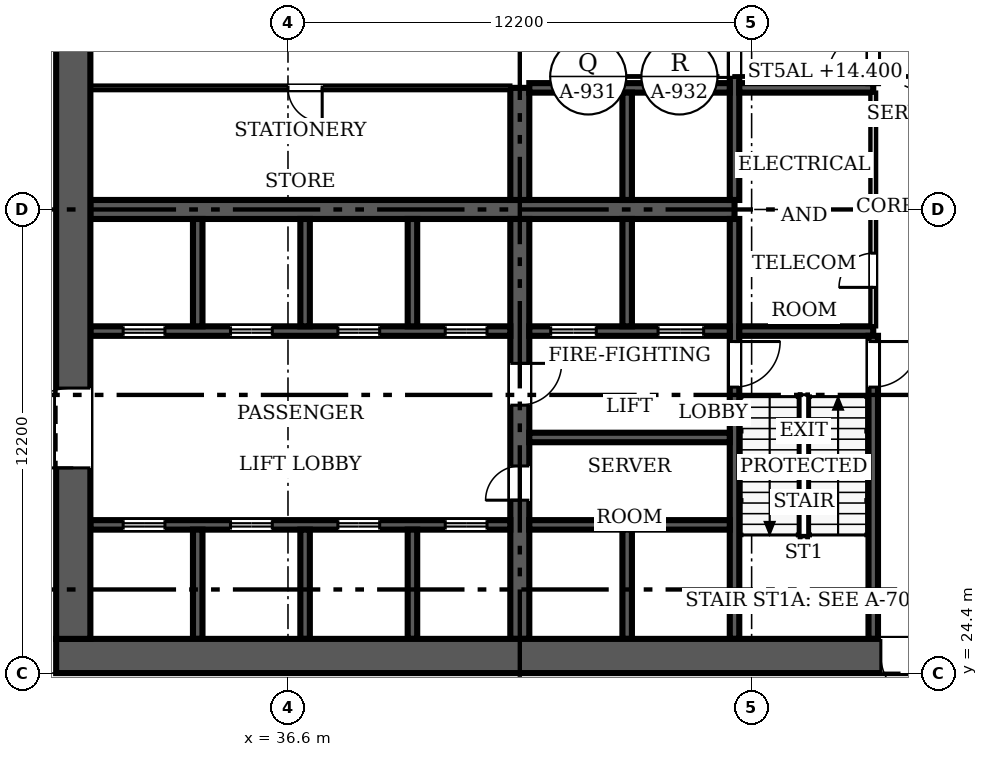
"""IFC4 building model, lengths in metres.
Left out: names, types, materials, properties, quantities, classifications, styles, units other than length and angle.
Written with IfcOpenShell. Run it as: python <this file> out.ifc"""

import sys

from ifc_helpers import new_model, si_unit, direction, frame, frame_2d, origin, place, context, subcontext, project, spatial, rectangle, extrude, source, transform, mapped, element, fill, save


model = new_model("IFC4")
c1 = context("Model", 3, precision=1e-05, world=origin(), true_north=direction((0.0, 1.0)))
c2 = subcontext(c1, "Body", "Model", "MODEL_VIEW")
j1 = project(units=[si_unit("LENGTHUNIT", "METRE"), si_unit("PLANEANGLEUNIT", "RADIAN")], contexts=[c1])
p1 = place(None, origin())
s1 = spatial("IfcSite", under=j1, at=p1, CompositionType="ELEMENT")
p2 = place(p1, origin())
s2 = spatial("IfcBuilding", under=s1, at=p2, CompositionType="ELEMENT")
p3 = place(p2, frame((0.0, 0.0, 12.0)))
s3 = spatial("IfcBuildingStorey", under=s2, at=p3, CompositionType="ELEMENT", Elevation=12.0)
p4 = place(p3, frame((54.9, 24.85, 0.0), z_axis=(0.0, 0.0, 1.0), x_axis=(-1.0, 0.0, 0.0)))
e1 = element("IfcWall", 1, at=p4, inside=s3, PredefinedType="SHEAR", context=c2, shape_type="SweptSolid", body=[
    extrude(rectangle(XDim=24.4, YDim=0.9, at=frame_2d((12.2, 0.0))), origin(), (0.0, 0.0, 1.0), 4.8),
])
m1 = source(origin(), c2, "Body", "SweptSolid", [
    extrude(rectangle(XDim=1.2, YDim=2.1, at=frame_2d((0.6, 1.05))), frame((0.0, 0.46, 0.0), z_axis=(0.0, -1.0, 0.0), x_axis=(1.0, 0.0, 0.0)), (0.0, 0.0, 1.0), 0.92),
])
p5 = place(p4, frame((1.5, 0.0, 0.0)))
e2 = element("IfcOpeningElement", 2, at=p5, cuts=e1, PredefinedType="OPENING", context=c2, shape_type="MappedRepresentation", body=[
    mapped(m1, transform((0.0, 0.0, 0.0), scale=1.0)),
])
p6 = place(p3, frame((30.95, 25.3, 0.0), z_axis=(0.0, 0.0, 1.0), x_axis=(0.0, 1.0, 0.0)))
e3 = element("IfcWall", 3, at=p6, inside=s3, PredefinedType="SHEAR", context=c2, shape_type="SweptSolid", body=[
    extrude(rectangle(XDim=22.6, YDim=0.9, at=frame_2d((11.3, 0.0))), origin(), (0.0, 0.0, 1.0), 4.8),
])
m2 = source(origin(), c2, "Body", "SweptSolid", [
    extrude(rectangle(XDim=2.1, YDim=2.4, at=frame_2d((1.05, 1.2))), frame((0.0, 0.46, 0.0), z_axis=(0.0, -1.0, 0.0), x_axis=(1.0, 0.0, 0.0)), (0.0, 0.0, 1.0), 0.92),
])
p7 = place(p6, frame((4.5, 0.0, 0.0)))
e4 = element("IfcOpeningElement", 4, at=p7, cuts=e3, PredefinedType="OPENING", context=c2, shape_type="MappedRepresentation", body=[
    mapped(m2, transform((0.0, 0.0, 0.0), scale=1.0)),
])
p8 = place(p6, frame((16.0, 0.0, 0.0)))
e5 = element("IfcOpeningElement", 5, at=p8, cuts=e3, PredefinedType="OPENING", context=c2, shape_type="MappedRepresentation", body=[
    mapped(m2, transform((0.0, 0.0, 0.0), scale=1.0)),
])
p9 = place(p3, frame((31.4, 36.6, 0.0), z_axis=(0.0, 0.0, 1.0), x_axis=(1.0, 0.0, 0.0)))
e6 = element("IfcWall", 6, at=p9, inside=s3, PredefinedType="SHEAR", context=c2, shape_type="SweptSolid", body=[
    extrude(rectangle(XDim=16.95, YDim=0.5, at=frame_2d((8.475, 0.0))), origin(), (0.0, 0.0, 1.0), 4.8),
])
p10 = place(p3, frame((42.7, 36.35, 0.0), z_axis=(0.0, 0.0, 1.0), x_axis=(0.0, -1.0, 0.0)))
e7 = element("IfcWall", 7, at=p10, inside=s3, PredefinedType="SHEAR", context=c2, shape_type="SweptSolid", body=[
    extrude(rectangle(XDim=11.05, YDim=0.5, at=frame_2d((5.525, 0.0))), origin(), (0.0, 0.0, 1.0), 4.8),
])
m3 = source(origin(), c2, "Body", "SweptSolid", [
    extrude(rectangle(XDim=0.9, YDim=2.1, at=frame_2d((0.45, 1.05))), frame((0.0, 0.26, 0.0), z_axis=(0.0, -1.0, 0.0), x_axis=(1.0, 0.0, 0.0)), (0.0, 0.0, 1.0), 0.52),
])
p11 = place(p10, frame((6.5, 0.0, 0.0)))
e8 = element("IfcOpeningElement", 8, at=p11, cuts=e7, PredefinedType="OPENING", context=c2, shape_type="MappedRepresentation", body=[
    mapped(m3, transform((0.0, 0.0, 0.0), scale=1.0)),
])
m4 = source(origin(), c2, "Body", "SweptSolid", [
    extrude(rectangle(XDim=1.1, YDim=2.1, at=frame_2d((0.55, 1.05))), frame((0.0, 0.26, 0.0), z_axis=(0.0, -1.0, 0.0), x_axis=(1.0, 0.0, 0.0)), (0.0, 0.0, 1.0), 0.52),
])
p12 = place(p10, frame((3.8, 0.0, 0.0)))
e9 = element("IfcOpeningElement", 9, at=p12, cuts=e7, PredefinedType="OPENING", context=c2, shape_type="MappedRepresentation", body=[
    mapped(m4, transform((0.0, 0.0, 0.0), scale=1.0)),
])
p13 = place(p3, frame((42.7, 36.85, 0.0), z_axis=(0.0, 0.0, 1.0), x_axis=(0.0, 1.0, 0.0)))
e10 = element("IfcWall", 10, at=p13, inside=s3, PredefinedType="SHEAR", context=c2, shape_type="SweptSolid", body=[
    extrude(rectangle(XDim=2.95, YDim=0.5, at=frame_2d((1.475, 0.0))), origin(), (0.0, 0.0, 1.0), 4.8),
])
p14 = place(p3, frame((48.35, 36.35, 0.0), z_axis=(0.0, 0.0, 1.0), x_axis=(0.0, -1.0, 0.0)))
e11 = element("IfcWall", 11, at=p14, inside=s3, PredefinedType="SOLIDWALL", context=c2, shape_type="SweptSolid", body=[
    extrude(rectangle(XDim=11.05, YDim=0.25, at=frame_2d((5.525, 0.0))), origin(), (0.0, 0.0, 1.0), 4.8),
])
m5 = source(origin(), c2, "Body", "SweptSolid", [
    extrude(rectangle(XDim=1.2, YDim=2.1, at=frame_2d((0.6, 1.05))), frame((0.0, 0.135, 0.0), z_axis=(0.0, -1.0, 0.0), x_axis=(1.0, 0.0, 0.0)), (0.0, 0.0, 1.0), 0.27),
])
p15 = place(p14, frame((3.225, 0.0, 0.0)))
e12 = element("IfcOpeningElement", 12, at=p15, cuts=e11, PredefinedType="OPENING", context=c2, shape_type="MappedRepresentation", body=[
    mapped(m5, transform((0.0, 0.0, 0.0), scale=1.0)),
])
p16 = place(p3, frame((48.35, 47.9, 0.0), z_axis=(0.0, 0.0, 1.0), x_axis=(0.0, -1.0, 0.0)))
e13 = element("IfcWall", 13, at=p16, inside=s3, PredefinedType="SOLIDWALL", context=c2, shape_type="SweptSolid", body=[
    extrude(rectangle(XDim=11.05, YDim=0.25, at=frame_2d((5.525, 0.0))), origin(), (0.0, 0.0, 1.0), 4.8),
])
p17 = place(p16, frame((6.625, 0.0, 0.0)))
e14 = element("IfcOpeningElement", 14, at=p17, cuts=e13, PredefinedType="OPENING", context=c2, shape_type="MappedRepresentation", body=[
    mapped(m5, transform((0.0, 0.0, 0.0), scale=1.0)),
])
p18 = place(p3, frame((42.45, 33.4, 0.0), z_axis=(0.0, 0.0, 1.0), x_axis=(-1.0, 0.0, 0.0)))
e15 = element("IfcWall", 15, at=p18, inside=s3, PredefinedType="SOLIDWALL", context=c2, shape_type="SweptSolid", body=[
    extrude(rectangle(XDim=11.05, YDim=0.25, at=frame_2d((5.525, 0.0))), origin(), (0.0, 0.0, 1.0), 4.8),
])
m6 = source(origin(), c2, "Body", "SweptSolid", [
    extrude(rectangle(XDim=1.1, YDim=2.1, at=frame_2d((0.55, 1.05))), frame((0.0, 0.135, 0.0), z_axis=(0.0, -1.0, 0.0), x_axis=(1.0, 0.0, 0.0)), (0.0, 0.0, 1.0), 0.27),
])
p19 = place(p18, frame((9.087, 0.0, 0.0)))
e16 = element("IfcOpeningElement", 16, at=p19, cuts=e15, PredefinedType="OPENING", context=c2, shape_type="MappedRepresentation", body=[
    mapped(m6, transform((0.0, 0.0, 0.0), scale=1.0)),
])
p20 = place(p18, frame((6.262, 0.0, 0.0)))
e17 = element("IfcOpeningElement", 17, at=p20, cuts=e15, PredefinedType="OPENING", context=c2, shape_type="MappedRepresentation", body=[
    mapped(m6, transform((0.0, 0.0, 0.0), scale=1.0)),
])
p21 = place(p18, frame((3.438, 0.0, 0.0)))
e18 = element("IfcOpeningElement", 18, at=p21, cuts=e15, PredefinedType="OPENING", context=c2, shape_type="MappedRepresentation", body=[
    mapped(m6, transform((0.0, 0.0, 0.0), scale=1.0)),
])
p22 = place(p18, frame((0.613, 0.0, 0.0)))
e19 = element("IfcOpeningElement", 19, at=p22, cuts=e15, PredefinedType="OPENING", context=c2, shape_type="MappedRepresentation", body=[
    mapped(m6, transform((0.0, 0.0, 0.0), scale=1.0)),
])
p23 = place(p3, frame((48.225, 33.4, 0.0), z_axis=(0.0, 0.0, 1.0), x_axis=(-1.0, 0.0, 0.0)))
e20 = element("IfcWall", 20, at=p23, inside=s3, PredefinedType="SOLIDWALL", context=c2, shape_type="SweptSolid", body=[
    extrude(rectangle(XDim=5.275, YDim=0.25, at=frame_2d((2.638, 0.0))), origin(), (0.0, 0.0, 1.0), 4.8),
])
p24 = place(p23, frame((3.512, 0.0, 0.0)))
e21 = element("IfcOpeningElement", 21, at=p24, cuts=e20, PredefinedType="OPENING", context=c2, shape_type="MappedRepresentation", body=[
    mapped(m5, transform((0.0, 0.0, 0.0), scale=1.0)),
])
p25 = place(p23, frame((0.688, 0.0, 0.0)))
e22 = element("IfcOpeningElement", 22, at=p25, cuts=e20, PredefinedType="OPENING", context=c2, shape_type="MappedRepresentation", body=[
    mapped(m5, transform((0.0, 0.0, 0.0), scale=1.0)),
])
p26 = place(p3, frame((48.475, 33.4, 0.0), z_axis=(0.0, 0.0, 1.0), x_axis=(1.0, 0.0, 0.0)))
e23 = element("IfcWall", 23, at=p26, inside=s3, PredefinedType="SOLIDWALL", context=c2, shape_type="SweptSolid", body=[
    extrude(rectangle(XDim=3.525, YDim=0.25, at=frame_2d((1.762, 0.0))), origin(), (0.0, 0.0, 1.0), 4.8),
])
p27 = place(p3, frame((31.4, 28.3, 0.0), z_axis=(0.0, 0.0, 1.0), x_axis=(1.0, 0.0, 0.0)))
e24 = element("IfcWall", 24, at=p27, inside=s3, PredefinedType="SOLIDWALL", context=c2, shape_type="SweptSolid", body=[
    extrude(rectangle(XDim=11.05, YDim=0.25, at=frame_2d((5.525, 0.0))), origin(), (0.0, 0.0, 1.0), 4.8),
])
p28 = place(p27, frame((0.863, 0.0, 0.0)))
e25 = element("IfcOpeningElement", 25, at=p28, cuts=e24, PredefinedType="OPENING", context=c2, shape_type="MappedRepresentation", body=[
    mapped(m6, transform((0.0, 0.0, 0.0), scale=1.0)),
])
p29 = place(p27, frame((3.688, 0.0, 0.0)))
e26 = element("IfcOpeningElement", 26, at=p29, cuts=e24, PredefinedType="OPENING", context=c2, shape_type="MappedRepresentation", body=[
    mapped(m6, transform((0.0, 0.0, 0.0), scale=1.0)),
])
p30 = place(p27, frame((6.512, 0.0, 0.0)))
e27 = element("IfcOpeningElement", 27, at=p30, cuts=e24, PredefinedType="OPENING", context=c2, shape_type="MappedRepresentation", body=[
    mapped(m6, transform((0.0, 0.0, 0.0), scale=1.0)),
])
p31 = place(p27, frame((9.337, 0.0, 0.0)))
e28 = element("IfcOpeningElement", 28, at=p31, cuts=e24, PredefinedType="OPENING", context=c2, shape_type="MappedRepresentation", body=[
    mapped(m6, transform((0.0, 0.0, 0.0), scale=1.0)),
])
for number, where, z_axis, x_axis in (
    (29, (42.95, 28.3, 0.0), (0.0, 0.0, 1.0), (1.0, 0.0, 0.0)),
    (30, (42.95, 39.8, 0.0), (0.0, 0.0, 1.0), (1.0, 0.0, 0.0)),
):
    element("IfcWall", number, at=place(p3, frame(where, z_axis=z_axis, x_axis=x_axis)), inside=s3, PredefinedType="SOLIDWALL", context=c2, shape_type="SweptSolid", body=[
        extrude(rectangle(XDim=5.275, YDim=0.25, at=frame_2d((2.638, 0.0))), origin(), (0.0, 0.0, 1.0), 4.8),
    ])
p32 = place(p3, frame((48.475, 39.8, 0.0), z_axis=(0.0, 0.0, 1.0), x_axis=(1.0, 0.0, 0.0)))
e31 = element("IfcWall", 31, at=p32, inside=s3, PredefinedType="SOLIDWALL", context=c2, shape_type="SweptSolid", body=[
    extrude(rectangle(XDim=3.525, YDim=0.25, at=frame_2d((1.762, 0.0))), origin(), (0.0, 0.0, 1.0), 4.8),
])
p33 = place(p3, frame((52.0, 25.3, 0.0), z_axis=(0.0, 0.0, 1.0), x_axis=(0.0, 1.0, 0.0)))
e32 = element("IfcWall", 32, at=p33, inside=s3, PredefinedType="SOLIDWALL", context=c2, shape_type="SweptSolid", body=[
    extrude(rectangle(XDim=7.975, YDim=0.25, at=frame_2d((3.987, 0.0))), origin(), (0.0, 0.0, 1.0), 4.8),
])
p34 = place(p33, frame((6.625, 0.0, 0.0)))
e33 = element("IfcOpeningElement", 33, at=p34, cuts=e32, PredefinedType="OPENING", context=c2, shape_type="MappedRepresentation", body=[
    mapped(m5, transform((0.0, 0.0, 0.0), scale=1.0)),
])
p35 = place(p3, frame((52.0, 39.925, 0.0), z_axis=(0.0, 0.0, 1.0), x_axis=(0.0, 1.0, 0.0)))
e34 = element("IfcWall", 34, at=p35, inside=s3, PredefinedType="SOLIDWALL", context=c2, shape_type="SweptSolid", body=[
    extrude(rectangle(XDim=7.975, YDim=0.25, at=frame_2d((3.987, 0.0))), origin(), (0.0, 0.0, 1.0), 4.8),
])
p36 = place(p35, frame((0.15, 0.0, 0.0)))
e35 = element("IfcOpeningElement", 35, at=p36, cuts=e34, PredefinedType="OPENING", context=c2, shape_type="MappedRepresentation", body=[
    mapped(m5, transform((0.0, 0.0, 0.0), scale=1.0)),
])
p37 = place(p3, frame((45.525, 33.525, 0.0), z_axis=(0.0, 0.0, 1.0), x_axis=(0.0, 1.0, 0.0)))
e36 = element("IfcWall", 36, at=p37, inside=s3, PredefinedType="SOLIDWALL", context=c2, shape_type="SweptSolid", body=[
    extrude(rectangle(XDim=2.825, YDim=0.25, at=frame_2d((1.413, 0.0))), origin(), (0.0, 0.0, 1.0), 4.8),
])
p38 = place(p3, frame((45.525, 36.85, 0.0), z_axis=(0.0, 0.0, 1.0), x_axis=(0.0, 1.0, 0.0)))
e37 = element("IfcWall", 37, at=p38, inside=s3, PredefinedType="SOLIDWALL", context=c2, shape_type="SweptSolid", body=[
    extrude(rectangle(XDim=2.825, YDim=0.25, at=frame_2d((1.413, 0.0))), origin(), (0.0, 0.0, 1.0), 4.8),
])
p39 = place(p3, frame((42.95, 30.6, 0.0), z_axis=(0.0, 0.0, 1.0), x_axis=(1.0, 0.0, 0.0)))
e38 = element("IfcWall", 38, at=p39, inside=s3, PredefinedType="SOLIDWALL", context=c2, shape_type="SweptSolid", body=[
    extrude(rectangle(XDim=5.275, YDim=0.25, at=frame_2d((2.638, 0.0))), origin(), (0.0, 0.0, 1.0), 4.8),
])
for number, where, z_axis, x_axis in (
    (39, (34.225, 33.525, 0.0), (0.0, 0.0, 1.0), (0.0, 1.0, 0.0)),
    (40, (37.05, 33.525, 0.0), (0.0, 0.0, 1.0), (0.0, 1.0, 0.0)),
    (41, (39.875, 33.525, 0.0), (0.0, 0.0, 1.0), (0.0, 1.0, 0.0)),
):
    element("IfcWall", number, at=place(p3, frame(where, z_axis=z_axis, x_axis=x_axis)), inside=s3, PredefinedType="SOLIDWALL", context=c2, shape_type="SweptSolid", body=[
        extrude(rectangle(XDim=2.825, YDim=0.25, at=frame_2d((1.413, 0.0))), origin(), (0.0, 0.0, 1.0), 4.8),
    ])
for number, where, z_axis, x_axis in (
    (42, (34.225, 25.3, 0.0), (0.0, 0.0, 1.0), (0.0, 1.0, 0.0)),
    (43, (37.05, 25.3, 0.0), (0.0, 0.0, 1.0), (0.0, 1.0, 0.0)),
    (44, (39.875, 25.3, 0.0), (0.0, 0.0, 1.0), (0.0, 1.0, 0.0)),
    (45, (45.525, 25.3, 0.0), (0.0, 0.0, 1.0), (0.0, 1.0, 0.0)),
):
    element("IfcWall", number, at=place(p3, frame(where, z_axis=z_axis, x_axis=x_axis)), inside=s3, PredefinedType="SOLIDWALL", context=c2, shape_type="SweptSolid", body=[
        extrude(rectangle(XDim=2.875, YDim=0.25, at=frame_2d((1.438, 0.0))), origin(), (0.0, 0.0, 1.0), 4.8),
    ])
p40 = place(p3, frame((42.45, 39.8, 0.0), z_axis=(0.0, 0.0, 1.0), x_axis=(-1.0, 0.0, 0.0)))
e46 = element("IfcWall", 46, at=p40, inside=s3, PredefinedType="PARTITIONING", context=c2, shape_type="SweptSolid", body=[
    extrude(rectangle(XDim=11.05, YDim=0.12, at=frame_2d((5.525, 0.0))), origin(), (0.0, 0.0, 1.0), 4.6),
])
m7 = source(origin(), c2, "Body", "SweptSolid", [
    extrude(rectangle(XDim=0.9, YDim=2.1, at=frame_2d((0.45, 1.05))), frame((0.0, 0.07, 0.0), z_axis=(0.0, -1.0, 0.0), x_axis=(1.0, 0.0, 0.0)), (0.0, 0.0, 1.0), 0.14),
])
p41 = place(p40, frame((4.95, 0.0, 0.0)))
e47 = element("IfcOpeningElement", 47, at=p41, cuts=e46, PredefinedType="OPENING", context=c2, shape_type="MappedRepresentation", body=[
    mapped(m7, transform((0.0, 0.0, 0.0), scale=1.0)),
])
p42 = place(p3, frame((52.0, 33.525, 0.0), z_axis=(0.0, 0.0, 1.0), x_axis=(0.0, 1.0, 0.0)))
e48 = element("IfcWall", 48, at=p42, inside=s3, PredefinedType="PARTITIONING", context=c2, shape_type="SweptSolid", body=[
    extrude(rectangle(XDim=6.15, YDim=0.15, at=frame_2d((3.075, 0.0))), origin(), (0.0, 0.0, 1.0), 4.6),
])
m8 = source(origin(), c2, "Body", "SweptSolid", [
    extrude(rectangle(XDim=0.9, YDim=2.1, at=frame_2d((0.45, 1.05))), frame((0.0, 0.085, 0.0), z_axis=(0.0, -1.0, 0.0), x_axis=(1.0, 0.0, 0.0)), (0.0, 0.0, 1.0), 0.17),
])
p43 = place(p42, frame((1.025, 0.0, 0.0)))
e49 = element("IfcOpeningElement", 49, at=p43, cuts=e48, PredefinedType="OPENING", context=c2, shape_type="MappedRepresentation", body=[
    mapped(m8, transform((0.0, 0.0, 0.0), scale=1.0)),
])
m9 = source(origin(), c2, "Body", "SweptSolid", [
    extrude(rectangle(XDim=1.2, YDim=2.1, at=frame_2d((0.6, 1.05))), frame((0.0, 0.025, 0.0), z_axis=(0.0, -1.0, 0.0), x_axis=(1.0, 0.0, 0.0)), (0.0, 0.0, 1.0), 0.05),
])
p44 = place(p5, origin())
e50 = element("IfcDoor", 50, at=p44, inside=s3, OperationType="SINGLE_SWING_LEFT", PredefinedType="DOOR", context=c2, shape_type="MappedRepresentation", body=[
    mapped(m9, transform((0.0, 0.0, 0.0), scale=1.0)),
])
fill(e2, e50)
m10 = source(origin(), c2, "Body", "SweptSolid", [
    extrude(rectangle(XDim=2.1, YDim=2.4, at=frame_2d((1.05, 1.2))), frame((0.0, 0.025, 0.0), z_axis=(0.0, -1.0, 0.0), x_axis=(1.0, 0.0, 0.0)), (0.0, 0.0, 1.0), 0.05),
])
p45 = place(p7, origin())
e51 = element("IfcDoor", 51, at=p45, inside=s3, OperationType="DOUBLE_DOOR_SINGLE_SWING", PredefinedType="DOOR", context=c2, shape_type="MappedRepresentation", body=[
    mapped(m10, transform((0.0, 0.0, 0.0), scale=1.0)),
])
fill(e4, e51)
m11 = source(origin(), c2, "Body", "SweptSolid", [
    extrude(rectangle(XDim=0.9, YDim=2.1, at=frame_2d((0.45, 1.05))), frame((0.0, 0.025, 0.0), z_axis=(0.0, -1.0, 0.0), x_axis=(1.0, 0.0, 0.0)), (0.0, 0.0, 1.0), 0.05),
])
p46 = place(p11, origin())
e52 = element("IfcDoor", 52, at=p46, inside=s3, OperationType="SINGLE_SWING_RIGHT", PredefinedType="DOOR", context=c2, shape_type="MappedRepresentation", body=[
    mapped(m11, transform((0.0, 0.0, 0.0), scale=1.0)),
])
fill(e8, e52)
m12 = source(origin(), c2, "Body", "SweptSolid", [
    extrude(rectangle(XDim=1.1, YDim=2.1, at=frame_2d((0.55, 1.05))), frame((0.0, 0.025, 0.0), z_axis=(0.0, -1.0, 0.0), x_axis=(1.0, 0.0, 0.0)), (0.0, 0.0, 1.0), 0.05),
])
p47 = place(p12, origin())
e53 = element("IfcDoor", 53, at=p47, inside=s3, OperationType="SINGLE_SWING_LEFT", PredefinedType="DOOR", context=c2, shape_type="MappedRepresentation", body=[
    mapped(m12, transform((0.0, 0.0, 0.0), scale=1.0)),
])
fill(e9, e53)
p48 = place(p15, origin())
e54 = element("IfcDoor", 54, at=p48, inside=s3, OperationType="SINGLE_SWING_LEFT", PredefinedType="DOOR", context=c2, shape_type="MappedRepresentation", body=[
    mapped(m9, transform((0.0, 0.0, 0.0), scale=1.0)),
])
fill(e12, e54)
p49 = place(p17, origin())
e55 = element("IfcDoor", 55, at=p49, inside=s3, OperationType="SINGLE_SWING_RIGHT", PredefinedType="DOOR", context=c2, shape_type="MappedRepresentation", body=[
    mapped(m9, transform((0.0, 0.0, 0.0), scale=1.0)),
])
fill(e14, e55)
p50 = place(p19, origin())
e56 = element("IfcDoor", 56, at=p50, inside=s3, OperationType="DOUBLE_DOOR_SLIDING", PredefinedType="DOOR", context=c2, shape_type="MappedRepresentation", body=[
    mapped(m12, transform((0.0, 0.0, 0.0), scale=1.0)),
])
fill(e16, e56)
p51 = place(p20, origin())
e57 = element("IfcDoor", 57, at=p51, inside=s3, OperationType="DOUBLE_DOOR_SLIDING", PredefinedType="DOOR", context=c2, shape_type="MappedRepresentation", body=[
    mapped(m12, transform((0.0, 0.0, 0.0), scale=1.0)),
])
fill(e17, e57)
p52 = place(p21, origin())
e58 = element("IfcDoor", 58, at=p52, inside=s3, OperationType="DOUBLE_DOOR_SLIDING", PredefinedType="DOOR", context=c2, shape_type="MappedRepresentation", body=[
    mapped(m12, transform((0.0, 0.0, 0.0), scale=1.0)),
])
fill(e18, e58)
p53 = place(p22, origin())
e59 = element("IfcDoor", 59, at=p53, inside=s3, OperationType="DOUBLE_DOOR_SLIDING", PredefinedType="DOOR", context=c2, shape_type="MappedRepresentation", body=[
    mapped(m12, transform((0.0, 0.0, 0.0), scale=1.0)),
])
fill(e19, e59)
p54 = place(p24, origin())
e60 = element("IfcDoor", 60, at=p54, inside=s3, OperationType="DOUBLE_DOOR_SLIDING", PredefinedType="DOOR", context=c2, shape_type="MappedRepresentation", body=[
    mapped(m9, transform((0.0, 0.0, 0.0), scale=1.0)),
])
fill(e21, e60)
p55 = place(p25, origin())
e61 = element("IfcDoor", 61, at=p55, inside=s3, OperationType="DOUBLE_DOOR_SLIDING", PredefinedType="DOOR", context=c2, shape_type="MappedRepresentation", body=[
    mapped(m9, transform((0.0, 0.0, 0.0), scale=1.0)),
])
fill(e22, e61)
p56 = place(p28, origin())
e62 = element("IfcDoor", 62, at=p56, inside=s3, OperationType="DOUBLE_DOOR_SLIDING", PredefinedType="DOOR", context=c2, shape_type="MappedRepresentation", body=[
    mapped(m12, transform((0.0, 0.0, 0.0), scale=1.0)),
])
fill(e25, e62)
p57 = place(p29, origin())
e63 = element("IfcDoor", 63, at=p57, inside=s3, OperationType="DOUBLE_DOOR_SLIDING", PredefinedType="DOOR", context=c2, shape_type="MappedRepresentation", body=[
    mapped(m12, transform((0.0, 0.0, 0.0), scale=1.0)),
])
fill(e26, e63)
p58 = place(p30, origin())
e64 = element("IfcDoor", 64, at=p58, inside=s3, OperationType="DOUBLE_DOOR_SLIDING", PredefinedType="DOOR", context=c2, shape_type="MappedRepresentation", body=[
    mapped(m12, transform((0.0, 0.0, 0.0), scale=1.0)),
])
fill(e27, e64)
p59 = place(p31, origin())
e65 = element("IfcDoor", 65, at=p59, inside=s3, OperationType="DOUBLE_DOOR_SLIDING", PredefinedType="DOOR", context=c2, shape_type="MappedRepresentation", body=[
    mapped(m12, transform((0.0, 0.0, 0.0), scale=1.0)),
])
fill(e28, e65)
p60 = place(p34, origin())
e66 = element("IfcDoor", 66, at=p60, inside=s3, OperationType="SINGLE_SWING_RIGHT", PredefinedType="DOOR", context=c2, shape_type="MappedRepresentation", body=[
    mapped(m9, transform((0.0, 0.0, 0.0), scale=1.0)),
])
fill(e33, e66)
p61 = place(p36, origin())
e67 = element("IfcDoor", 67, at=p61, inside=s3, OperationType="SINGLE_SWING_LEFT", PredefinedType="DOOR", context=c2, shape_type="MappedRepresentation", body=[
    mapped(m9, transform((0.0, 0.0, 0.0), scale=1.0)),
])
fill(e35, e67)
p62 = place(p41, origin())
e68 = element("IfcDoor", 68, at=p62, inside=s3, OperationType="SINGLE_SWING_LEFT", PredefinedType="DOOR", context=c2, shape_type="MappedRepresentation", body=[
    mapped(m11, transform((0.0, 0.0, 0.0), scale=1.0)),
])
fill(e47, e68)
p63 = place(p43, origin())
e69 = element("IfcDoor", 69, at=p63, inside=s3, OperationType="SINGLE_SWING_LEFT", PredefinedType="DOOR", context=c2, shape_type="MappedRepresentation", body=[
    mapped(m11, transform((0.0, 0.0, 0.0), scale=1.0)),
])
fill(e49, e69)
save(model, sys.argv[1])
